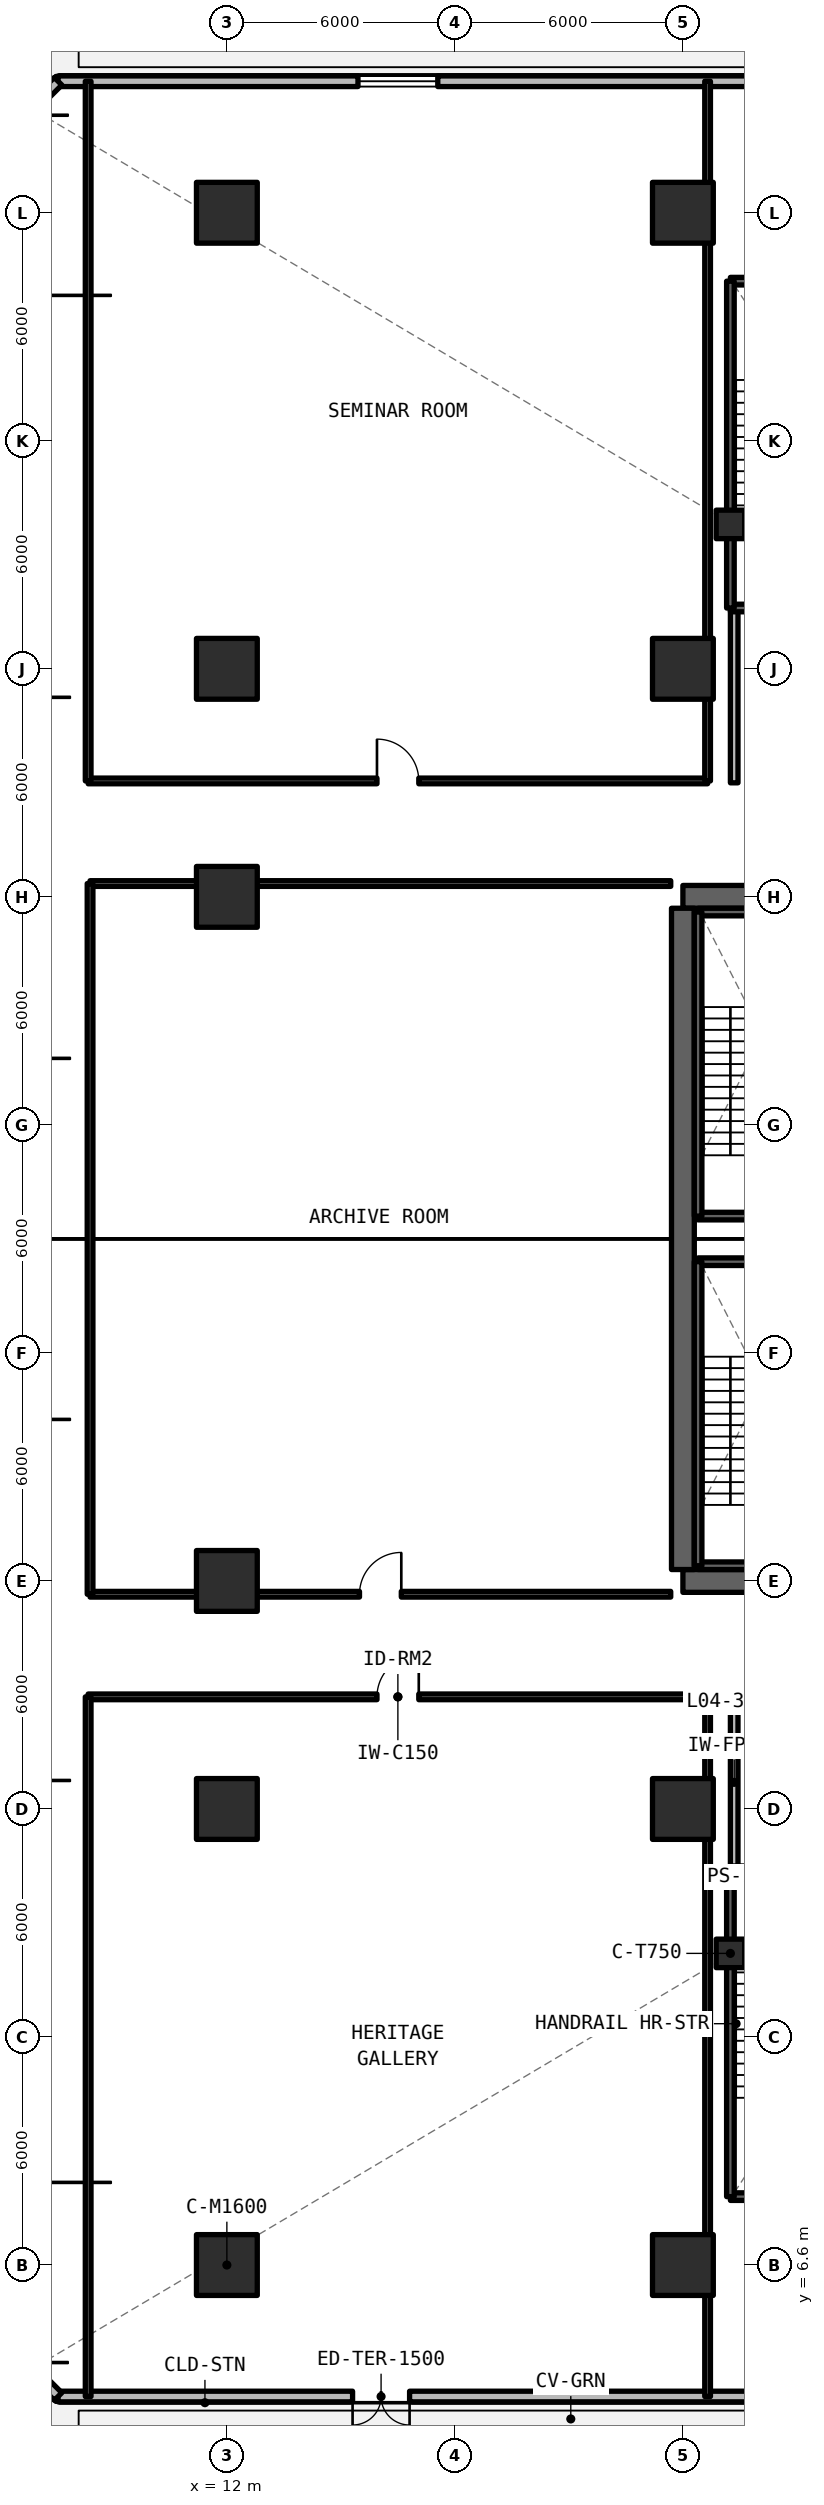
"""IFC4 building model, lengths in metres.
Left out: names, types, materials, properties, quantities, classifications, styles, units other than length and angle.
Written with IfcOpenShell. Run it as: python <this file> out.ifc"""

import sys

from ifc_helpers import new_model, si_unit, direction, frame, frame_2d, origin, origin_2d, place, context, subcontext, project, spatial, rectangle, extrude, element, fill, save


model = new_model("IFC4")
c1 = context("Model", 3, precision=1e-05, world=origin(), true_north=direction((0.0, 1.0)))
c2 = subcontext(c1, "Body", "Model", "MODEL_VIEW")
j1 = project(units=[si_unit("LENGTHUNIT", "METRE"), si_unit("PLANEANGLEUNIT", "RADIAN")], contexts=[c1])
p1 = place(None, origin())
s1 = spatial("IfcSite", under=j1, at=p1, CompositionType="ELEMENT")
p2 = place(p1, origin())
s2 = spatial("IfcBuilding", under=s1, at=p2, CompositionType="ELEMENT")
p3 = place(p2, frame((0.0, 0.0, 14.85)))
s3 = spatial("IfcBuildingStorey", under=s2, at=p3, CompositionType="ELEMENT", Elevation=14.85)
for number, where, z_axis, x_axis in (
    (1, (24.0, 24.6, 0.0), (0.0, 0.0, 1.0), (1.0, 0.0, 0.0)),
    (2, (36.0, 42.6, 0.0), (0.0, 0.0, 1.0), (-1.0, 0.0, 0.0)),
):
    element("IfcWall", number, at=place(p3, frame(where, z_axis=z_axis, x_axis=x_axis)), inside=s3, PredefinedType="SHEAR", context=c2, shape_type="SweptSolid", body=[
        extrude(rectangle(XDim=12.0, YDim=0.6, at=frame_2d((6.0, 0.0))), origin(), (0.0, 0.0, 1.0), 4.62),
    ])
p4 = place(p3, frame((24.0, 24.9, 0.0), z_axis=(0.0, 0.0, 1.0), x_axis=(0.0, 1.0, 0.0)))
e3 = element("IfcWall", 3, at=p4, inside=s3, PredefinedType="SHEAR", context=c2, shape_type="SweptSolid", body=[
    extrude(rectangle(XDim=17.4, YDim=0.6, at=frame_2d((8.7, 0.0))), origin(), (0.0, 0.0, 1.0), 4.62),
])
for number, where, z_axis, x_axis in (
    (4, (12.0, 6.6, 0.0), (0.0, 0.0, 1.0), (1.0, 0.0, 0.0)),
    (5, (12.0, 24.6, 0.0), (0.0, 0.0, 1.0), (1.0, 0.0, 0.0)),
    (6, (12.0, 42.6, 0.0), (0.0, 0.0, 1.0), (1.0, 0.0, 0.0)),
    (7, (12.0, 60.6, 0.0), (0.0, 0.0, 1.0), (1.0, 0.0, 0.0)),
    (8, (24.0, 6.6, 0.0), (0.0, 0.0, 1.0), (1.0, 0.0, 0.0)),
    (9, (24.0, 60.6, 0.0), (0.0, 0.0, 1.0), (1.0, 0.0, 0.0)),
    (10, (12.0, 18.6, 0.0), (0.0, 0.0, 1.0), (1.0, 0.0, 0.0)),
    (11, (12.0, 48.6, 0.0), (0.0, 0.0, 1.0), (1.0, 0.0, 0.0)),
    (12, (24.0, 18.6, 0.0), (0.0, 0.0, 1.0), (1.0, 0.0, 0.0)),
    (13, (24.0, 48.6, 0.0), (0.0, 0.0, 1.0), (1.0, 0.0, 0.0)),
):
    element("IfcColumn", number, at=place(p3, frame(where, z_axis=z_axis, x_axis=x_axis)), inside=s3, PredefinedType="COLUMN", context=c2, shape_type="SweptSolid", body=[
        extrude(rectangle(XDim=1.6, YDim=1.6, at=origin_2d()), origin(), (0.0, 0.0, 1.0), 4.62),
    ])
for number, where, z_axis, x_axis in (
    (14, (25.25, 14.8, 0.0), (0.0, 0.0, 1.0), (1.0, 0.0, 0.0)),
    (15, (25.25, 52.4, 0.0), (0.0, 0.0, 1.0), (1.0, 0.0, 0.0)),
):
    element("IfcColumn", number, at=place(p3, frame(where, z_axis=z_axis, x_axis=x_axis)), inside=s3, PredefinedType="COLUMN", context=c2, shape_type="SweptSolid", body=[
        extrude(rectangle(XDim=0.75, YDim=0.75, at=origin_2d()), origin(), (0.0, 0.0, 1.0), 4.62),
    ])
p5 = place(p3, frame((7.558, 3.14, 0.0), z_axis=(0.0, 0.0, 1.0), x_axis=(1.0, 0.0, 0.0)))
e16 = element("IfcWall", 16, at=p5, inside=s3, PredefinedType="SOLIDWALL", context=c2, shape_type="SweptSolid", body=[
    extrude(rectangle(XDim=42.242, YDim=0.28, at=frame_2d((21.121, 0.0))), origin(), (0.0, 0.0, 1.0), 4.34),
])
p6 = place(p5, frame((7.75, 0.0, 0.0)))
e17 = element("IfcOpeningElement", 17, at=p6, cuts=e16, PredefinedType="OPENING", context=c2, shape_type="SweptSolid", body=[
    extrude(rectangle(XDim=1.5, YDim=2.2, at=frame_2d((0.75, 1.1))), frame((0.0, 0.15, 0.0), z_axis=(0.0, -1.0, 0.0), x_axis=(1.0, 0.0, 0.0)), (0.0, 0.0, 1.0), 0.3),
])
p7 = place(p5, frame((28.092, 0.0, 0.78)))
e18 = element("IfcOpeningElement", 18, at=p7, cuts=e16, PredefinedType="OPENING", context=c2, shape_type="SweptSolid", body=[
    extrude(rectangle(XDim=2.1, YDim=1.66, at=frame_2d((1.05, 0.83))), frame((0.0, 0.15, 0.0), z_axis=(0.0, -1.0, 0.0), x_axis=(1.0, 0.0, 0.0)), (0.0, 0.0, 1.0), 0.3),
])
p8 = place(p5, frame((24.821, 0.0, 0.78)))
e19 = element("IfcOpeningElement", 19, at=p8, cuts=e16, PredefinedType="OPENING", context=c2, shape_type="SweptSolid", body=[
    extrude(rectangle(XDim=2.1, YDim=1.66, at=frame_2d((1.05, 0.83))), frame((0.0, 0.15, 0.0), z_axis=(0.0, -1.0, 0.0), x_axis=(1.0, 0.0, 0.0)), (0.0, 0.0, 1.0), 0.3),
])
p9 = place(p5, frame((34.321, 0.0, 0.78)))
e20 = element("IfcOpeningElement", 20, at=p9, cuts=e16, PredefinedType="OPENING", context=c2, shape_type="SweptSolid", body=[
    extrude(rectangle(XDim=2.1, YDim=1.66, at=frame_2d((1.05, 0.83))), frame((0.0, 0.15, 0.0), z_axis=(0.0, -1.0, 0.0), x_axis=(1.0, 0.0, 0.0)), (0.0, 0.0, 1.0), 0.3),
])
p10 = place(p3, frame((49.8, 64.06, 0.0), z_axis=(0.0, 0.0, 1.0), x_axis=(-1.0, 0.0, 0.0)))
e21 = element("IfcWall", 21, at=p10, inside=s3, PredefinedType="SOLIDWALL", context=c2, shape_type="SweptSolid", body=[
    extrude(rectangle(XDim=42.242, YDim=0.28, at=frame_2d((21.121, 0.0))), origin(), (0.0, 0.0, 1.0), 4.34),
])
p11 = place(p10, frame((32.25, 0.0, 0.78)))
e22 = element("IfcOpeningElement", 22, at=p11, cuts=e21, PredefinedType="OPENING", context=c2, shape_type="SweptSolid", body=[
    extrude(rectangle(XDim=2.1, YDim=1.66, at=frame_2d((1.05, 0.83))), frame((0.0, 0.15, 0.0), z_axis=(0.0, -1.0, 0.0), x_axis=(1.0, 0.0, 0.0)), (0.0, 0.0, 1.0), 0.3),
])
p12 = place(p10, frame((11.15, 0.0, 0.78)))
e23 = element("IfcOpeningElement", 23, at=p12, cuts=e21, PredefinedType="OPENING", context=c2, shape_type="SweptSolid", body=[
    extrude(rectangle(XDim=2.1, YDim=1.66, at=frame_2d((1.05, 0.83))), frame((0.0, 0.15, 0.0), z_axis=(0.0, -1.0, 0.0), x_axis=(1.0, 0.0, 0.0)), (0.0, 0.0, 1.0), 0.3),
])
p13 = place(p10, frame((1.25, 0.0, 0.78)))
e24 = element("IfcOpeningElement", 24, at=p13, cuts=e21, PredefinedType="OPENING", context=c2, shape_type="SweptSolid", body=[
    extrude(rectangle(XDim=2.1, YDim=1.66, at=frame_2d((1.05, 0.83))), frame((0.0, 0.15, 0.0), z_axis=(0.0, -1.0, 0.0), x_axis=(1.0, 0.0, 0.0)), (0.0, 0.0, 1.0), 0.3),
])
p14 = place(p10, frame((21.35, 0.0, 0.78)))
e25 = element("IfcOpeningElement", 25, at=p14, cuts=e21, PredefinedType="OPENING", context=c2, shape_type="SweptSolid", body=[
    extrude(rectangle(XDim=2.1, YDim=1.66, at=frame_2d((1.05, 0.83))), frame((0.0, 0.15, 0.0), z_axis=(0.0, -1.0, 0.0), x_axis=(1.0, 0.0, 0.0)), (0.0, 0.0, 1.0), 0.3),
])
p15 = place(p10, frame((5.821, 0.0, 0.78)))
e26 = element("IfcOpeningElement", 26, at=p15, cuts=e21, PredefinedType="OPENING", context=c2, shape_type="SweptSolid", body=[
    extrude(rectangle(XDim=2.1, YDim=1.66, at=frame_2d((1.05, 0.83))), frame((0.0, 0.15, 0.0), z_axis=(0.0, -1.0, 0.0), x_axis=(1.0, 0.0, 0.0)), (0.0, 0.0, 1.0), 0.3),
])
p16 = place(p10, frame((15.321, 0.0, 0.78)))
e27 = element("IfcOpeningElement", 27, at=p16, cuts=e21, PredefinedType="OPENING", context=c2, shape_type="SweptSolid", body=[
    extrude(rectangle(XDim=2.1, YDim=1.66, at=frame_2d((1.05, 0.83))), frame((0.0, 0.15, 0.0), z_axis=(0.0, -1.0, 0.0), x_axis=(1.0, 0.0, 0.0)), (0.0, 0.0, 1.0), 0.3),
])
p17 = place(p3, frame((7.558, 64.06, 0.0), z_axis=(0.0, 0.0, 1.0), x_axis=(-0.707106781187, -0.707106781187, 0.0)))
e28 = element("IfcWall", 28, at=p17, inside=s3, PredefinedType="SOLIDWALL", context=c2, shape_type="SweptSolid", body=[
    extrude(rectangle(XDim=2.854, YDim=0.28, at=frame_2d((1.427, 0.0))), origin(), (0.0, 0.0, 1.0), 4.34),
])
p18 = place(p17, frame((0.727, 0.0, 0.78)))
e29 = element("IfcOpeningElement", 29, at=p18, cuts=e28, PredefinedType="OPENING", context=c2, shape_type="SweptSolid", body=[
    extrude(rectangle(XDim=1.4, YDim=1.65, at=frame_2d((0.7, 0.825))), frame((0.0, 0.15, 0.0), z_axis=(0.0, -1.0, 0.0), x_axis=(1.0, 0.0, 0.0)), (0.0, 0.0, 1.0), 0.3),
])
p19 = place(p3, frame((5.54, 5.158, 0.0), z_axis=(0.0, 0.0, 1.0), x_axis=(0.707106781187, -0.707106781187, 0.0)))
e30 = element("IfcWall", 30, at=p19, inside=s3, PredefinedType="SOLIDWALL", context=c2, shape_type="SweptSolid", body=[
    extrude(rectangle(XDim=2.854, YDim=0.28, at=frame_2d((1.427, 0.0))), origin(), (0.0, 0.0, 1.0), 4.34),
])
p20 = place(p19, frame((0.727, 0.0, 0.78)))
e31 = element("IfcOpeningElement", 31, at=p20, cuts=e30, PredefinedType="OPENING", context=c2, shape_type="SweptSolid", body=[
    extrude(rectangle(XDim=1.4, YDim=1.65, at=frame_2d((0.7, 0.825))), frame((0.0, 0.15, 0.0), z_axis=(0.0, -1.0, 0.0), x_axis=(1.0, 0.0, 0.0)), (0.0, 0.0, 1.0), 0.3),
])
p21 = place(p3, frame((25.35, 17.0, 0.0), z_axis=(0.0, 0.0, 1.0), x_axis=(0.0, 1.0, 0.0)))
e32 = element("IfcWall", 32, at=p21, inside=s3, PredefinedType="SOLIDWALL", context=c2, shape_type="SweptSolid", body=[
    extrude(rectangle(XDim=4.6, YDim=0.2, at=frame_2d((2.3, 0.0))), origin(), (0.0, 0.0, 1.0), 3.56),
])
p22 = place(p3, frame((25.35, 45.6, 0.0), z_axis=(0.0, 0.0, 1.0), x_axis=(0.0, 1.0, 0.0)))
e33 = element("IfcWall", 33, at=p22, inside=s3, PredefinedType="SOLIDWALL", context=c2, shape_type="SweptSolid", body=[
    extrude(rectangle(XDim=4.6, YDim=0.2, at=frame_2d((2.3, 0.0))), origin(), (0.0, 0.0, 1.0), 3.56),
])
p23 = place(p3, frame((8.35, 21.55, 0.0), z_axis=(0.0, 0.0, 1.0), x_axis=(1.0, 0.0, 0.0)))
e34 = element("IfcWall", 34, at=p23, inside=s3, PredefinedType="SOLIDWALL", context=c2, shape_type="SweptSolid", body=[
    extrude(rectangle(XDim=16.3, YDim=0.15, at=frame_2d((8.15, 0.0))), origin(), (0.0, 0.0, 1.0), 3.56),
])
p24 = place(p23, frame((7.6, 0.0, 0.0)))
e35 = element("IfcOpeningElement", 35, at=p24, cuts=e34, PredefinedType="OPENING", context=c2, shape_type="SweptSolid", body=[
    extrude(rectangle(XDim=1.1, YDim=2.15, at=frame_2d((0.55, 1.075))), frame((0.0, 0.085, 0.0), z_axis=(0.0, -1.0, 0.0), x_axis=(1.0, 0.0, 0.0)), (0.0, 0.0, 1.0), 0.17),
])
for number, where, z_axis, x_axis in (
    (36, (8.35, 3.14, 0.0), (0.0, 0.0, 1.0), (0.0, 1.0, 0.0)),
    (37, (24.65, 3.14, 0.0), (0.0, 0.0, 1.0), (0.0, 1.0, 0.0)),
):
    element("IfcWall", number, at=place(p3, frame(where, z_axis=z_axis, x_axis=x_axis)), inside=s3, PredefinedType="SOLIDWALL", context=c2, shape_type="SweptSolid", body=[
        extrude(rectangle(XDim=18.41, YDim=0.15, at=frame_2d((9.205, 0.0))), origin(), (0.0, 0.0, 1.0), 3.56),
    ])
p25 = place(p3, frame((8.35, 45.65, 0.0), z_axis=(0.0, 0.0, 1.0), x_axis=(1.0, 0.0, 0.0)))
e38 = element("IfcWall", 38, at=p25, inside=s3, PredefinedType="SOLIDWALL", context=c2, shape_type="SweptSolid", body=[
    extrude(rectangle(XDim=16.3, YDim=0.15, at=frame_2d((8.15, 0.0))), origin(), (0.0, 0.0, 1.0), 3.56),
])
p26 = place(p25, frame((7.6, 0.0, 0.0)))
e39 = element("IfcOpeningElement", 39, at=p26, cuts=e38, PredefinedType="OPENING", context=c2, shape_type="SweptSolid", body=[
    extrude(rectangle(XDim=1.1, YDim=2.15, at=frame_2d((0.55, 1.075))), frame((0.0, 0.085, 0.0), z_axis=(0.0, -1.0, 0.0), x_axis=(1.0, 0.0, 0.0)), (0.0, 0.0, 1.0), 0.17),
])
for number, where, z_axis, x_axis in (
    (40, (8.35, 45.65, 0.0), (0.0, 0.0, 1.0), (0.0, 1.0, 0.0)),
    (41, (24.65, 45.65, 0.0), (0.0, 0.0, 1.0), (0.0, 1.0, 0.0)),
):
    element("IfcWall", number, at=place(p3, frame(where, z_axis=z_axis, x_axis=x_axis)), inside=s3, PredefinedType="SOLIDWALL", context=c2, shape_type="SweptSolid", body=[
        extrude(rectangle(XDim=18.41, YDim=0.15, at=frame_2d((9.205, 0.0))), origin(), (0.0, 0.0, 1.0), 3.56),
    ])
p27 = place(p3, frame((8.4, 24.25, 0.0), z_axis=(0.0, 0.0, 1.0), x_axis=(1.0, 0.0, 0.0)))
e42 = element("IfcWall", 42, at=p27, inside=s3, PredefinedType="SOLIDWALL", context=c2, shape_type="SweptSolid", body=[
    extrude(rectangle(XDim=15.28, YDim=0.15, at=frame_2d((7.64, 0.0))), origin(), (0.0, 0.0, 1.0), 3.56),
])
p28 = place(p27, frame((7.09, 0.0, 0.0)))
e43 = element("IfcOpeningElement", 43, at=p28, cuts=e42, PredefinedType="OPENING", context=c2, shape_type="SweptSolid", body=[
    extrude(rectangle(XDim=1.1, YDim=2.15, at=frame_2d((0.55, 1.075))), frame((0.0, 0.085, 0.0), z_axis=(0.0, -1.0, 0.0), x_axis=(1.0, 0.0, 0.0)), (0.0, 0.0, 1.0), 0.17),
])
p29 = place(p3, frame((8.4, 42.95, 0.0), z_axis=(0.0, 0.0, 1.0), x_axis=(1.0, 0.0, 0.0)))
e44 = element("IfcWall", 44, at=p29, inside=s3, PredefinedType="SOLIDWALL", context=c2, shape_type="SweptSolid", body=[
    extrude(rectangle(XDim=15.28, YDim=0.15, at=frame_2d((7.64, 0.0))), origin(), (0.0, 0.0, 1.0), 3.56),
])
p30 = place(p3, frame((8.4, 24.25, 0.0), z_axis=(0.0, 0.0, 1.0), x_axis=(0.0, 1.0, 0.0)))
e45 = element("IfcWall", 45, at=p30, inside=s3, PredefinedType="SOLIDWALL", context=c2, shape_type="SweptSolid", body=[
    extrude(rectangle(XDim=18.7, YDim=0.15, at=frame_2d((9.35, 0.0))), origin(), (0.0, 0.0, 1.0), 3.56),
])
for number, where, z_axis, x_axis in (
    (46, (24.4, 25.0, 0.0), (0.0, 0.0, 1.0), (1.0, 0.0, 0.0)),
    (47, (27.8, 33.0, 0.0), (0.0, 0.0, 1.0), (-1.0, 0.0, 0.0)),
):
    element("IfcWall", number, at=place(p3, frame(where, z_axis=z_axis, x_axis=x_axis)), inside=s3, PredefinedType="SOLIDWALL", context=c2, shape_type="SweptSolid", body=[
        extrude(rectangle(XDim=3.4, YDim=0.2, at=frame_2d((1.7, 0.0))), origin(), (0.0, 0.0, 1.0), 4.62),
    ])
p31 = place(p3, frame((24.4, 33.0, 0.0), z_axis=(0.0, 0.0, 1.0), x_axis=(0.0, -1.0, 0.0)))
e48 = element("IfcWall", 48, at=p31, inside=s3, PredefinedType="SOLIDWALL", context=c2, shape_type="SweptSolid", body=[
    extrude(rectangle(XDim=8.0, YDim=0.2, at=frame_2d((4.0, 0.0))), origin(), (0.0, 0.0, 1.0), 4.62),
])
for number, where, z_axis, x_axis in (
    (49, (24.4, 34.2, 0.0), (0.0, 0.0, 1.0), (1.0, 0.0, 0.0)),
    (50, (27.8, 42.2, 0.0), (0.0, 0.0, 1.0), (-1.0, 0.0, 0.0)),
):
    element("IfcWall", number, at=place(p3, frame(where, z_axis=z_axis, x_axis=x_axis)), inside=s3, PredefinedType="SOLIDWALL", context=c2, shape_type="SweptSolid", body=[
        extrude(rectangle(XDim=3.4, YDim=0.2, at=frame_2d((1.7, 0.0))), origin(), (0.0, 0.0, 1.0), 4.62),
    ])
p32 = place(p3, frame((24.4, 42.2, 0.0), z_axis=(0.0, 0.0, 1.0), x_axis=(0.0, -1.0, 0.0)))
e51 = element("IfcWall", 51, at=p32, inside=s3, PredefinedType="SOLIDWALL", context=c2, shape_type="SweptSolid", body=[
    extrude(rectangle(XDim=8.0, YDim=0.2, at=frame_2d((4.0, 0.0))), origin(), (0.0, 0.0, 1.0), 4.62),
])
p33 = place(p3, frame((25.25, 8.4, 0.0), z_axis=(0.0, 0.0, 1.0), x_axis=(1.0, 0.0, 0.0)))
e52 = element("IfcWall", 52, at=p33, inside=s3, PredefinedType="SOLIDWALL", context=c2, shape_type="SweptSolid", body=[
    extrude(rectangle(XDim=4.4, YDim=0.2, at=frame_2d((2.2, 0.0))), origin(), (0.0, 0.0, 1.0), 4.62),
])
p34 = place(p3, frame((29.65, 17.0, 0.0), z_axis=(0.0, 0.0, 1.0), x_axis=(-1.0, 0.0, 0.0)))
e53 = element("IfcWall", 53, at=p34, inside=s3, PredefinedType="SOLIDWALL", context=c2, shape_type="SweptSolid", body=[
    extrude(rectangle(XDim=4.4, YDim=0.2, at=frame_2d((2.2, 0.0))), origin(), (0.0, 0.0, 1.0), 4.62),
])
p35 = place(p34, frame((1.625, 0.0, 0.0)))
e54 = element("IfcOpeningElement", 54, at=p35, cuts=e53, PredefinedType="OPENING", context=c2, shape_type="SweptSolid", body=[
    extrude(rectangle(XDim=1.15, YDim=2.15, at=frame_2d((0.575, 1.075))), frame((0.0, 0.11, 0.0), z_axis=(0.0, -1.0, 0.0), x_axis=(1.0, 0.0, 0.0)), (0.0, 0.0, 1.0), 0.22),
])
p36 = place(p3, frame((25.25, 17.0, 0.0), z_axis=(0.0, 0.0, 1.0), x_axis=(0.0, -1.0, 0.0)))
e55 = element("IfcWall", 55, at=p36, inside=s3, PredefinedType="SOLIDWALL", context=c2, shape_type="SweptSolid", body=[
    extrude(rectangle(XDim=8.6, YDim=0.2, at=frame_2d((4.3, 0.0))), origin(), (0.0, 0.0, 1.0), 4.62),
])
p37 = place(p3, frame((25.25, 50.2, 0.0), z_axis=(0.0, 0.0, 1.0), x_axis=(1.0, 0.0, 0.0)))
e56 = element("IfcWall", 56, at=p37, inside=s3, PredefinedType="SOLIDWALL", context=c2, shape_type="SweptSolid", body=[
    extrude(rectangle(XDim=4.4, YDim=0.2, at=frame_2d((2.2, 0.0))), origin(), (0.0, 0.0, 1.0), 4.62),
])
p38 = place(p37, frame((1.625, 0.0, 0.0)))
e57 = element("IfcOpeningElement", 57, at=p38, cuts=e56, PredefinedType="OPENING", context=c2, shape_type="SweptSolid", body=[
    extrude(rectangle(XDim=1.15, YDim=2.15, at=frame_2d((0.575, 1.075))), frame((0.0, 0.11, 0.0), z_axis=(0.0, -1.0, 0.0), x_axis=(1.0, 0.0, 0.0)), (0.0, 0.0, 1.0), 0.22),
])
p39 = place(p3, frame((29.65, 58.8, 0.0), z_axis=(0.0, 0.0, 1.0), x_axis=(-1.0, 0.0, 0.0)))
e58 = element("IfcWall", 58, at=p39, inside=s3, PredefinedType="SOLIDWALL", context=c2, shape_type="SweptSolid", body=[
    extrude(rectangle(XDim=4.4, YDim=0.2, at=frame_2d((2.2, 0.0))), origin(), (0.0, 0.0, 1.0), 4.62),
])
p40 = place(p3, frame((25.25, 58.8, 0.0), z_axis=(0.0, 0.0, 1.0), x_axis=(0.0, -1.0, 0.0)))
e59 = element("IfcWall", 59, at=p40, inside=s3, PredefinedType="SOLIDWALL", context=c2, shape_type="SweptSolid", body=[
    extrude(rectangle(XDim=8.6, YDim=0.2, at=frame_2d((4.3, 0.0))), origin(), (0.0, 0.0, 1.0), 4.62),
])
p41 = place(p6, frame((1.5, 0.0, 0.0), z_axis=(0.0, 0.0, 1.0), x_axis=(-1.0, 0.0, 0.0)))
e60 = element("IfcDoor", 60, at=p41, inside=s3, OperationType="SINGLE_SWING_RIGHT", PredefinedType="DOOR", context=c2, shape_type="SweptSolid", body=[
    extrude(rectangle(XDim=1.5, YDim=2.2, at=frame_2d((0.75, 1.1))), frame((0.0, 0.025, 0.0), z_axis=(0.0, -1.0, 0.0), x_axis=(1.0, 0.0, 0.0)), (0.0, 0.0, 1.0), 0.05),
])
fill(e17, e60)
p42 = place(p11, origin())
e61 = element("IfcWindow", 61, at=p42, inside=s3, PartitioningType="SINGLE_PANEL", PredefinedType="WINDOW", context=c2, shape_type="SweptSolid", body=[
    extrude(rectangle(XDim=2.1, YDim=1.66, at=frame_2d((1.05, 0.83))), frame((0.0, 0.03, 0.0), z_axis=(0.0, -1.0, 0.0), x_axis=(1.0, 0.0, 0.0)), (0.0, 0.0, 1.0), 0.06),
])
fill(e22, e61)
p43 = place(p24, origin())
e62 = element("IfcDoor", 62, at=p43, inside=s3, OperationType="SINGLE_SWING_RIGHT", PredefinedType="DOOR", context=c2, shape_type="SweptSolid", body=[
    extrude(rectangle(XDim=1.1, YDim=2.15, at=frame_2d((0.55, 1.075))), frame((0.0, 0.025, 0.0), z_axis=(0.0, -1.0, 0.0), x_axis=(1.0, 0.0, 0.0)), (0.0, 0.0, 1.0), 0.05),
])
fill(e35, e62)
p44 = place(p26, origin())
e63 = element("IfcDoor", 63, at=p44, inside=s3, OperationType="SINGLE_SWING_LEFT", PredefinedType="DOOR", context=c2, shape_type="SweptSolid", body=[
    extrude(rectangle(XDim=1.1, YDim=2.15, at=frame_2d((0.55, 1.075))), frame((0.0, 0.025, 0.0), z_axis=(0.0, -1.0, 0.0), x_axis=(1.0, 0.0, 0.0)), (0.0, 0.0, 1.0), 0.05),
])
fill(e39, e63)
p45 = place(p28, origin())
e64 = element("IfcDoor", 64, at=p45, inside=s3, OperationType="SINGLE_SWING_RIGHT", PredefinedType="DOOR", context=c2, shape_type="SweptSolid", body=[
    extrude(rectangle(XDim=1.1, YDim=2.15, at=frame_2d((0.55, 1.075))), frame((0.0, 0.025, 0.0), z_axis=(0.0, -1.0, 0.0), x_axis=(1.0, 0.0, 0.0)), (0.0, 0.0, 1.0), 0.05),
])
fill(e43, e64)
save(model, sys.argv[1])
